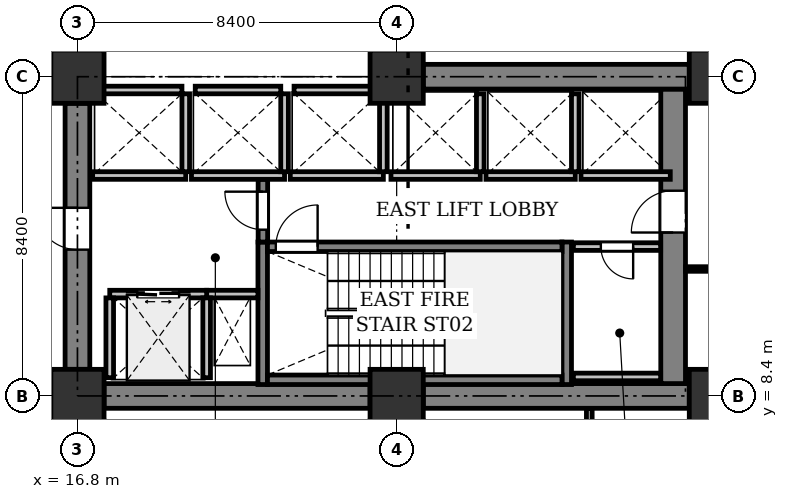
"""IFC4 building model, lengths in metres.
Left out: names, types, materials, properties, quantities, classifications, styles, units other than length and angle.
Written with IfcOpenShell. Run it as: python <this file> out.ifc"""

import sys

from ifc_helpers import new_model, si_unit, direction, frame, frame_2d, origin, origin_2d, place, context, subcontext, project, spatial, rectangle, extrude, element, fill, save


model = new_model("IFC4")
c1 = context("Model", 3, precision=1e-05, world=origin(), true_north=direction((0.0, 1.0)))
c2 = subcontext(c1, "Body", "Model", "MODEL_VIEW")
j1 = project(units=[si_unit("LENGTHUNIT", "METRE"), si_unit("PLANEANGLEUNIT", "RADIAN")], contexts=[c1])
p1 = place(None, origin())
s1 = spatial("IfcSite", under=j1, at=p1, CompositionType="ELEMENT")
p2 = place(p1, origin())
s2 = spatial("IfcBuilding", under=s1, at=p2, CompositionType="ELEMENT")
p3 = place(p2, frame((0.0, 0.0, 24.8)))
s3 = spatial("IfcBuildingStorey", under=s2, at=p3, CompositionType="ELEMENT", Elevation=24.8)
for number, where, z_axis, x_axis in (
    (1, (16.8, 8.4, 0.0), (0.0, 0.0, 1.0), (1.0, 0.0, 0.0)),
    (2, (16.8, 16.8, 0.0), (0.0, 0.0, 1.0), (1.0, 0.0, 0.0)),
    (3, (25.2, 8.4, 0.0), (0.0, 0.0, 1.0), (1.0, 0.0, 0.0)),
    (4, (25.2, 16.8, 0.0), (0.0, 0.0, 1.0), (1.0, 0.0, 0.0)),
    (5, (33.6, 8.4, 0.0), (0.0, 0.0, 1.0), (1.0, 0.0, 0.0)),
    (6, (33.6, 16.8, 0.0), (0.0, 0.0, 1.0), (1.0, 0.0, 0.0)),
):
    element("IfcColumn", number, at=place(p3, frame(where, z_axis=z_axis, x_axis=x_axis)), inside=s3, PredefinedType="COLUMN", context=c2, shape_type="SweptSolid", body=[
        extrude(rectangle(XDim=1.4, YDim=1.4, at=origin_2d()), origin(), (0.0, 0.0, 1.0), 4.2),
    ])
for number, where, z_axis, x_axis in (
    (7, (17.5, 8.4, 0.0), (0.0, 0.0, 1.0), (1.0, 0.0, 0.0)),
    (8, (25.9, 8.4, 0.0), (0.0, 0.0, 1.0), (1.0, 0.0, 0.0)),
):
    element("IfcWall", number, at=place(p3, frame(where, z_axis=z_axis, x_axis=x_axis)), inside=s3, PredefinedType="SHEAR", context=c2, shape_type="SweptSolid", body=[
        extrude(rectangle(XDim=7.0, YDim=0.65, at=frame_2d((3.5, 0.0))), origin(), (0.0, 0.0, 1.0), 3.925),
    ])
p4 = place(p3, frame((32.475, 8.725, 0.0), z_axis=(0.0, 0.0, 1.0), x_axis=(0.0, 1.0, 0.0)))
e9 = element("IfcWall", 9, at=p4, inside=s3, PredefinedType="SHEAR", context=c2, shape_type="SweptSolid", body=[
    extrude(rectangle(XDim=7.75, YDim=0.65, at=frame_2d((3.875, 0.0))), origin(), (0.0, 0.0, 1.0), 3.925),
])
p5 = place(p4, frame((3.975, 0.0, 0.0)))
e10 = element("IfcOpeningElement", 10, at=p5, cuts=e9, PredefinedType="OPENING", context=c2, shape_type="SweptSolid", body=[
    extrude(rectangle(XDim=1.1, YDim=2.15, at=frame_2d((0.55, 1.075))), frame((0.0, 0.335, 0.0), z_axis=(0.0, -1.0, 0.0), x_axis=(1.0, 0.0, 0.0)), (0.0, 0.0, 1.0), 0.67),
])
p6 = place(p3, frame((16.8, 9.1, 0.0), z_axis=(0.0, 0.0, 1.0), x_axis=(0.0, 1.0, 0.0)))
e11 = element("IfcWall", 11, at=p6, inside=s3, PredefinedType="SHEAR", context=c2, shape_type="SweptSolid", body=[
    extrude(rectangle(XDim=7.0, YDim=0.65, at=frame_2d((3.5, 0.0))), origin(), (0.0, 0.0, 1.0), 3.925),
])
p7 = place(p6, frame((3.15, 0.0, 0.0)))
e12 = element("IfcOpeningElement", 12, at=p7, cuts=e11, PredefinedType="OPENING", context=c2, shape_type="SweptSolid", body=[
    extrude(rectangle(XDim=1.1, YDim=2.15, at=frame_2d((0.55, 1.075))), frame((0.0, 0.335, 0.0), z_axis=(0.0, -1.0, 0.0), x_axis=(1.0, 0.0, 0.0)), (0.0, 0.0, 1.0), 0.67),
])
p8 = place(p3, frame((25.9, 16.8, 0.0), z_axis=(0.0, 0.0, 1.0), x_axis=(1.0, 0.0, 0.0)))
e13 = element("IfcWall", 13, at=p8, inside=s3, PredefinedType="SHEAR", context=c2, shape_type="SweptSolid", body=[
    extrude(rectangle(XDim=7.0, YDim=0.65, at=frame_2d((3.5, 0.0))), origin(), (0.0, 0.0, 1.0), 3.925),
])
for number, where, z_axis, x_axis in (
    (14, (21.675, 8.7, 0.0), (0.0, 0.0, 1.0), (0.0, 1.0, 0.0)),
    (15, (29.675, 8.7, 0.0), (0.0, 0.0, 1.0), (0.0, 1.0, 0.0)),
):
    element("IfcWall", number, at=place(p3, frame(where, z_axis=z_axis, x_axis=x_axis)), inside=s3, PredefinedType="SHEAR", context=c2, shape_type="SweptSolid", body=[
        extrude(rectangle(XDim=3.75, YDim=0.25, at=frame_2d((1.875, 0.0))), origin(), (0.0, 0.0, 1.0), 3.925),
    ])
p9 = place(p3, frame((21.8, 8.825, 0.0), z_axis=(0.0, 0.0, 1.0), x_axis=(1.0, 0.0, 0.0)))
e16 = element("IfcWall", 16, at=p9, inside=s3, PredefinedType="SHEAR", context=c2, shape_type="SweptSolid", body=[
    extrude(rectangle(XDim=7.75, YDim=0.25, at=frame_2d((3.875, 0.0))), origin(), (0.0, 0.0, 1.0), 3.925),
])
p10 = place(p3, frame((21.8, 12.325, 0.0), z_axis=(0.0, 0.0, 1.0), x_axis=(1.0, 0.0, 0.0)))
e17 = element("IfcWall", 17, at=p10, inside=s3, PredefinedType="SHEAR", context=c2, shape_type="SweptSolid", body=[
    extrude(rectangle(XDim=7.75, YDim=0.25, at=frame_2d((3.875, 0.0))), origin(), (0.0, 0.0, 1.0), 3.925),
])
p11 = place(p10, frame((0.22, 0.0, 0.0)))
e18 = element("IfcOpeningElement", 18, at=p11, cuts=e17, PredefinedType="OPENING", context=c2, shape_type="SweptSolid", body=[
    extrude(rectangle(XDim=1.1, YDim=2.15, at=frame_2d((0.55, 1.075))), frame((0.0, 0.135, 0.0), z_axis=(0.0, -1.0, 0.0), x_axis=(1.0, 0.0, 0.0)), (0.0, 0.0, 1.0), 0.27),
])
p12 = place(p3, frame((20.2, 11.08, 0.0), z_axis=(0.0, 0.0, 1.0), x_axis=(1.0, 0.0, 0.0)))
e19 = element("IfcWall", 19, at=p12, inside=s3, PredefinedType="PARTITIONING", context=c2, shape_type="SweptSolid", body=[
    extrude(rectangle(XDim=1.35, YDim=0.2, at=frame_2d((0.675, 0.0))), origin(), (0.0, 0.0, 1.0), 3.925),
])
p13 = place(p3, frame((21.68, 12.45, 0.0), z_axis=(0.0, 0.0, 1.0), x_axis=(0.0, 1.0, 0.0)))
e20 = element("IfcWall", 20, at=p13, inside=s3, PredefinedType="SHEAR", context=c2, shape_type="SweptSolid", body=[
    extrude(rectangle(XDim=1.65, YDim=0.25, at=frame_2d((0.825, 0.0))), origin(), (0.0, 0.0, 1.0), 3.925),
])
p14 = place(p13, frame((0.325, 0.0, 0.0)))
e21 = element("IfcOpeningElement", 21, at=p14, cuts=e20, PredefinedType="OPENING", context=c2, shape_type="SweptSolid", body=[
    extrude(rectangle(XDim=1.0, YDim=2.15, at=frame_2d((0.5, 1.075))), frame((0.0, 0.135, 0.0), z_axis=(0.0, -1.0, 0.0), x_axis=(1.0, 0.0, 0.0)), (0.0, 0.0, 1.0), 0.27),
])
p15 = place(p3, frame((17.65, 11.08, 0.0), z_axis=(0.0, 0.0, 1.0), x_axis=(1.0, 0.0, 0.0)))
e22 = element("IfcWall", 22, at=p15, inside=s3, PredefinedType="PARTITIONING", context=c2, shape_type="SweptSolid", body=[
    extrude(rectangle(XDim=2.55, YDim=0.2, at=frame_2d((1.275, 0.0))), origin(), (0.0, 0.0, 1.0), 3.925),
])
p16 = place(p15, frame((0.725, 0.0, 0.0)))
e23 = element("IfcOpeningElement", 23, at=p16, cuts=e22, PredefinedType="OPENING", context=c2, shape_type="SweptSolid", body=[
    extrude(rectangle(XDim=1.1, YDim=2.2, at=frame_2d((0.55, 1.1))), frame((0.0, 0.11, 0.0), z_axis=(0.0, -1.0, 0.0), x_axis=(1.0, 0.0, 0.0)), (0.0, 0.0, 1.0), 0.22),
])
for number, where, z_axis, x_axis in (
    (24, (20.2, 8.88, 0.0), (0.0, 0.0, 1.0), (0.0, 1.0, 0.0)),
    (25, (17.65, 8.88, 0.0), (0.0, 0.0, 1.0), (0.0, 1.0, 0.0)),
):
    element("IfcWall", number, at=place(p3, frame(where, z_axis=z_axis, x_axis=x_axis)), inside=s3, PredefinedType="PARTITIONING", context=c2, shape_type="SweptSolid", body=[
        extrude(rectangle(XDim=2.1, YDim=0.2, at=frame_2d((1.05, 0.0))), origin(), (0.0, 0.0, 1.0), 3.925),
    ])
p17 = place(p3, frame((17.2, 14.2, 0.0), z_axis=(0.0, 0.0, 1.0), x_axis=(1.0, 0.0, 0.0)))
e26 = element("IfcWall", 26, at=p17, inside=s3, PredefinedType="PARTITIONING", context=c2, shape_type="SweptSolid", body=[
    extrude(rectangle(XDim=2.45, YDim=0.2, at=frame_2d((1.225, 0.0))), origin(), (0.0, 0.0, 1.0), 3.925),
])
p18 = place(p3, frame((19.65, 14.3, 0.0), z_axis=(0.0, 0.0, 1.0), x_axis=(0.0, 1.0, 0.0)))
e27 = element("IfcWall", 27, at=p18, inside=s3, PredefinedType="PARTITIONING", context=c2, shape_type="SweptSolid", body=[
    extrude(rectangle(XDim=2.05, YDim=0.2, at=frame_2d((1.025, 0.0))), origin(), (0.0, 0.0, 1.0), 3.925),
])
p19 = place(p3, frame((17.3, 16.45, 0.0), z_axis=(0.0, 0.0, 1.0), x_axis=(1.0, 0.0, 0.0)))
e28 = element("IfcWall", 28, at=p19, inside=s3, PredefinedType="PARTITIONING", context=c2, shape_type="SweptSolid", body=[
    extrude(rectangle(XDim=2.25, YDim=0.2, at=frame_2d((1.125, 0.0))), origin(), (0.0, 0.0, 1.0), 3.925),
])
p20 = place(p3, frame((19.8, 14.2, 0.0), z_axis=(0.0, 0.0, 1.0), x_axis=(1.0, 0.0, 0.0)))
e29 = element("IfcWall", 29, at=p20, inside=s3, PredefinedType="PARTITIONING", context=c2, shape_type="SweptSolid", body=[
    extrude(rectangle(XDim=2.45, YDim=0.2, at=frame_2d((1.225, 0.0))), origin(), (0.0, 0.0, 1.0), 3.925),
])
p21 = place(p3, frame((22.25, 14.3, 0.0), z_axis=(0.0, 0.0, 1.0), x_axis=(0.0, 1.0, 0.0)))
e30 = element("IfcWall", 30, at=p21, inside=s3, PredefinedType="PARTITIONING", context=c2, shape_type="SweptSolid", body=[
    extrude(rectangle(XDim=2.05, YDim=0.2, at=frame_2d((1.025, 0.0))), origin(), (0.0, 0.0, 1.0), 3.925),
])
p22 = place(p3, frame((19.9, 16.45, 0.0), z_axis=(0.0, 0.0, 1.0), x_axis=(1.0, 0.0, 0.0)))
e31 = element("IfcWall", 31, at=p22, inside=s3, PredefinedType="PARTITIONING", context=c2, shape_type="SweptSolid", body=[
    extrude(rectangle(XDim=2.25, YDim=0.2, at=frame_2d((1.125, 0.0))), origin(), (0.0, 0.0, 1.0), 3.925),
])
p23 = place(p3, frame((22.4, 14.2, 0.0), z_axis=(0.0, 0.0, 1.0), x_axis=(1.0, 0.0, 0.0)))
e32 = element("IfcWall", 32, at=p23, inside=s3, PredefinedType="PARTITIONING", context=c2, shape_type="SweptSolid", body=[
    extrude(rectangle(XDim=2.45, YDim=0.2, at=frame_2d((1.225, 0.0))), origin(), (0.0, 0.0, 1.0), 3.925),
])
p24 = place(p3, frame((24.85, 14.3, 0.0), z_axis=(0.0, 0.0, 1.0), x_axis=(0.0, 1.0, 0.0)))
e33 = element("IfcWall", 33, at=p24, inside=s3, PredefinedType="PARTITIONING", context=c2, shape_type="SweptSolid", body=[
    extrude(rectangle(XDim=2.05, YDim=0.2, at=frame_2d((1.025, 0.0))), origin(), (0.0, 0.0, 1.0), 3.925),
])
p25 = place(p3, frame((22.5, 16.45, 0.0), z_axis=(0.0, 0.0, 1.0), x_axis=(1.0, 0.0, 0.0)))
e34 = element("IfcWall", 34, at=p25, inside=s3, PredefinedType="PARTITIONING", context=c2, shape_type="SweptSolid", body=[
    extrude(rectangle(XDim=2.25, YDim=0.2, at=frame_2d((1.125, 0.0))), origin(), (0.0, 0.0, 1.0), 3.925),
])
p26 = place(p3, frame((25.05, 14.2, 0.0), z_axis=(0.0, 0.0, 1.0), x_axis=(1.0, 0.0, 0.0)))
e35 = element("IfcWall", 35, at=p26, inside=s3, PredefinedType="PARTITIONING", context=c2, shape_type="SweptSolid", body=[
    extrude(rectangle(XDim=2.35, YDim=0.2, at=frame_2d((1.175, 0.0))), origin(), (0.0, 0.0, 1.0), 3.925),
])
p27 = place(p3, frame((27.4, 14.3, 0.0), z_axis=(0.0, 0.0, 1.0), x_axis=(0.0, 1.0, 0.0)))
e36 = element("IfcWall", 36, at=p27, inside=s3, PredefinedType="PARTITIONING", context=c2, shape_type="SweptSolid", body=[
    extrude(rectangle(XDim=2.05, YDim=0.2, at=frame_2d((1.025, 0.0))), origin(), (0.0, 0.0, 1.0), 3.925),
])
p28 = place(p3, frame((27.55, 14.2, 0.0), z_axis=(0.0, 0.0, 1.0), x_axis=(1.0, 0.0, 0.0)))
e37 = element("IfcWall", 37, at=p28, inside=s3, PredefinedType="PARTITIONING", context=c2, shape_type="SweptSolid", body=[
    extrude(rectangle(XDim=2.35, YDim=0.2, at=frame_2d((1.175, 0.0))), origin(), (0.0, 0.0, 1.0), 3.925),
])
p29 = place(p3, frame((29.9, 14.3, 0.0), z_axis=(0.0, 0.0, 1.0), x_axis=(0.0, 1.0, 0.0)))
e38 = element("IfcWall", 38, at=p29, inside=s3, PredefinedType="PARTITIONING", context=c2, shape_type="SweptSolid", body=[
    extrude(rectangle(XDim=2.05, YDim=0.2, at=frame_2d((1.025, 0.0))), origin(), (0.0, 0.0, 1.0), 3.925),
])
p30 = place(p3, frame((30.05, 14.2, 0.0), z_axis=(0.0, 0.0, 1.0), x_axis=(1.0, 0.0, 0.0)))
e39 = element("IfcWall", 39, at=p30, inside=s3, PredefinedType="PARTITIONING", context=c2, shape_type="SweptSolid", body=[
    extrude(rectangle(XDim=2.35, YDim=0.2, at=frame_2d((1.175, 0.0))), origin(), (0.0, 0.0, 1.0), 3.925),
])
p31 = place(p3, frame((32.146, 12.33, 0.0), z_axis=(0.0, 0.0, 1.0), x_axis=(-1.0, 0.0, 0.0)))
e40 = element("IfcWall", 40, at=p31, inside=s3, PredefinedType="PARTITIONING", context=c2, shape_type="SweptSolid", body=[
    extrude(rectangle(XDim=2.296, YDim=0.2, at=frame_2d((1.148, 0.0))), origin(), (0.0, 0.0, 1.0), 3.925),
])
p32 = place(p31, frame((0.723, 0.0, 0.0)))
e41 = element("IfcOpeningElement", 41, at=p32, cuts=e40, PredefinedType="OPENING", context=c2, shape_type="SweptSolid", body=[
    extrude(rectangle(XDim=0.85, YDim=2.15, at=frame_2d((0.425, 1.075))), frame((0.0, 0.11, 0.0), z_axis=(0.0, -1.0, 0.0), x_axis=(1.0, 0.0, 0.0)), (0.0, 0.0, 1.0), 0.22),
])
p33 = place(p3, frame((29.85, 8.9, 0.0), z_axis=(0.0, 0.0, 1.0), x_axis=(1.0, 0.0, 0.0)))
e42 = element("IfcWall", 42, at=p33, inside=s3, PredefinedType="PARTITIONING", context=c2, shape_type="SweptSolid", body=[
    extrude(rectangle(XDim=2.296, YDim=0.2, at=frame_2d((1.148, 0.0))), origin(), (0.0, 0.0, 1.0), 3.925),
])
p34 = place(p3, frame((34.261, 11.74, 0.0), z_axis=(0.0, 0.0, 1.0), x_axis=(-1.0, 0.0, 0.0)))
e43 = element("IfcWall", 43, at=p34, inside=s3, PredefinedType="PARTITIONING", context=c2, shape_type="SweptSolid", body=[
    extrude(rectangle(XDim=1.457, YDim=0.12, at=frame_2d((0.729, 0.0))), origin(), (0.0, 0.0, 1.0), 3.323),
])
p35 = place(p5, origin())
e44 = element("IfcDoor", 44, at=p35, inside=s3, OperationType="SINGLE_SWING_RIGHT", PredefinedType="DOOR", context=c2, shape_type="SweptSolid", body=[
    extrude(rectangle(XDim=1.1, YDim=2.15, at=frame_2d((0.55, 1.075))), frame((0.0, 0.025, 0.0), z_axis=(0.0, -1.0, 0.0), x_axis=(1.0, 0.0, 0.0)), (0.0, 0.0, 1.0), 0.05),
])
fill(e10, e44)
p36 = place(p7, origin())
e45 = element("IfcDoor", 45, at=p36, inside=s3, OperationType="SINGLE_SWING_LEFT", PredefinedType="DOOR", context=c2, shape_type="SweptSolid", body=[
    extrude(rectangle(XDim=1.1, YDim=2.15, at=frame_2d((0.55, 1.075))), frame((0.0, 0.025, 0.0), z_axis=(0.0, -1.0, 0.0), x_axis=(1.0, 0.0, 0.0)), (0.0, 0.0, 1.0), 0.05),
])
fill(e12, e45)
p37 = place(p11, origin())
e46 = element("IfcDoor", 46, at=p37, inside=s3, OperationType="SINGLE_SWING_LEFT", PredefinedType="DOOR", context=c2, shape_type="SweptSolid", body=[
    extrude(rectangle(XDim=1.1, YDim=2.15, at=frame_2d((0.55, 1.075))), frame((0.0, 0.025, 0.0), z_axis=(0.0, -1.0, 0.0), x_axis=(1.0, 0.0, 0.0)), (0.0, 0.0, 1.0), 0.05),
])
fill(e18, e46)
p38 = place(p14, origin())
e47 = element("IfcDoor", 47, at=p38, inside=s3, OperationType="SINGLE_SWING_LEFT", PredefinedType="DOOR", context=c2, shape_type="SweptSolid", body=[
    extrude(rectangle(XDim=1.0, YDim=2.15, at=frame_2d((0.5, 1.075))), frame((0.0, 0.025, 0.0), z_axis=(0.0, -1.0, 0.0), x_axis=(1.0, 0.0, 0.0)), (0.0, 0.0, 1.0), 0.05),
])
fill(e21, e47)
p39 = place(p16, origin())
e48 = element("IfcDoor", 48, at=p39, inside=s3, OperationType="DOUBLE_DOOR_SLIDING", PredefinedType="DOOR", context=c2, shape_type="SweptSolid", body=[
    extrude(rectangle(XDim=1.1, YDim=2.2, at=frame_2d((0.55, 1.1))), frame((0.0, 0.025, 0.0), z_axis=(0.0, -1.0, 0.0), x_axis=(1.0, 0.0, 0.0)), (0.0, 0.0, 1.0), 0.05),
])
fill(e23, e48)
p40 = place(p32, origin())
e49 = element("IfcDoor", 49, at=p40, inside=s3, OperationType="SINGLE_SWING_LEFT", PredefinedType="DOOR", context=c2, shape_type="SweptSolid", body=[
    extrude(rectangle(XDim=0.85, YDim=2.15, at=frame_2d((0.425, 1.075))), frame((0.0, 0.025, 0.0), z_axis=(0.0, -1.0, 0.0), x_axis=(1.0, 0.0, 0.0)), (0.0, 0.0, 1.0), 0.05),
])
fill(e41, e49)
save(model, sys.argv[1])
